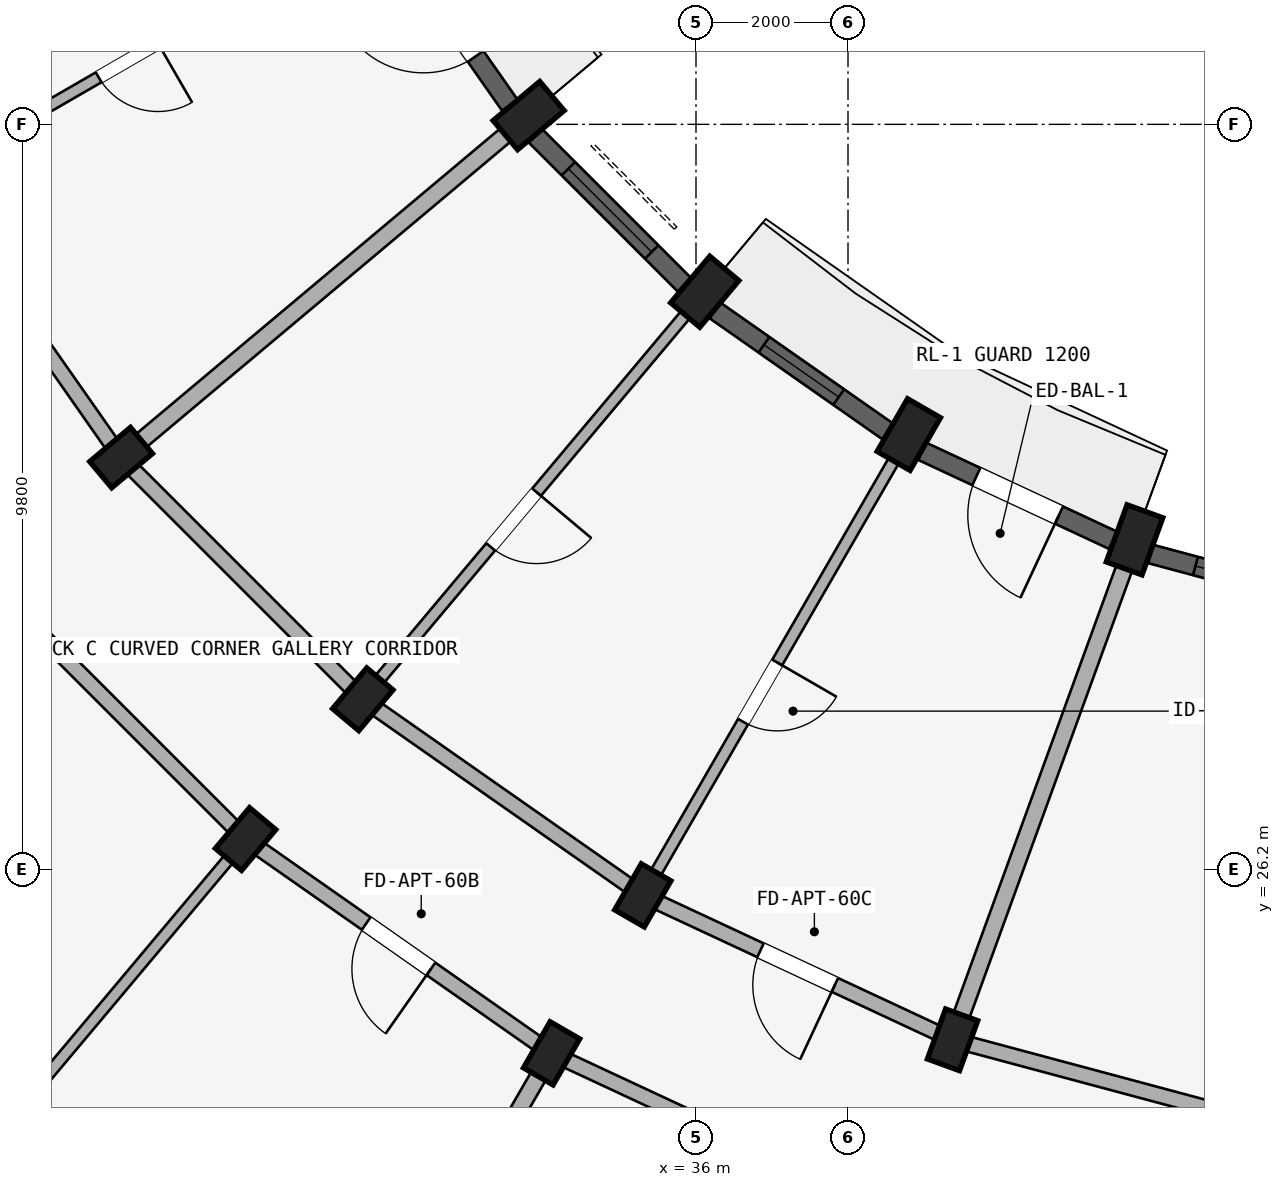
"""IFC4 building model, lengths in metres.
Left out: names, types, materials, properties, quantities, classifications, styles, units other than length and angle.
Written with IfcOpenShell. Run it as: python <this file> out.ifc"""

import sys

from ifc_helpers import new_model, si_unit, direction, frame, frame_2d, origin, origin_2d, place, context, subcontext, project, spatial, rectangle, extrude, element, fill, save


model = new_model("IFC4")
c1 = context("Model", 3, precision=1e-05, world=origin(), true_north=direction((0.0, 1.0)))
c2 = subcontext(c1, "Body", "Model", "MODEL_VIEW")
j1 = project(units=[si_unit("LENGTHUNIT", "METRE"), si_unit("PLANEANGLEUNIT", "RADIAN")], contexts=[c1])
p1 = place(None, origin())
s1 = spatial("IfcSite", under=j1, at=p1, CompositionType="ELEMENT")
p2 = place(p1, origin())
s2 = spatial("IfcBuilding", under=s1, at=p2, CompositionType="ELEMENT")
p3 = place(p2, frame((0.0, 0.0, 18.15)))
s3 = spatial("IfcBuildingStorey", under=s2, at=p3, CompositionType="ELEMENT", Elevation=18.15)
p4 = place(p3, frame((41.77, 30.534, 0.0), z_axis=(0.0, 0.0, 1.0), x_axis=(-0.939692620786, 0.342020143326, 0.0)))
e1 = element("IfcColumn", 1, at=p4, inside=s3, PredefinedType="COLUMN", context=c2, shape_type="SweptSolid", body=[
    extrude(rectangle(XDim=0.5, YDim=0.8, at=origin_2d()), origin(), (0.0, 0.0, 1.0), 2.93),
])
p5 = place(p3, frame((39.376, 23.956, 0.0), z_axis=(0.0, 0.0, 1.0), x_axis=(-0.939692620786, 0.342020143326, 0.0)))
e2 = element("IfcColumn", 2, at=p5, inside=s3, PredefinedType="COLUMN", context=c2, shape_type="SweptSolid", body=[
    extrude(rectangle(XDim=0.45, YDim=0.7, at=origin_2d()), origin(), (0.0, 0.0, 1.0), 2.93),
])
p6 = place(p3, frame((38.8, 31.919, 0.0), z_axis=(0.0, 0.0, 1.0), x_axis=(-0.866025403784, 0.5, 0.0)))
e3 = element("IfcColumn", 3, at=p6, inside=s3, PredefinedType="COLUMN", context=c2, shape_type="SweptSolid", body=[
    extrude(rectangle(XDim=0.5, YDim=0.8, at=origin_2d()), origin(), (0.0, 0.0, 1.0), 2.93),
])
for number, where, z_axis, x_axis in (
    (4, (35.3, 25.856, 0.0), (0.0, 0.0, 1.0), (-0.866, 0.5, 0.0)),
    (5, (34.1, 23.778, 0.0), (0.0, 0.0, 1.0), (-0.866, 0.5, 0.0)),
):
    element("IfcColumn", number, at=place(p3, frame(where, z_axis=z_axis, x_axis=x_axis)), inside=s3, PredefinedType="COLUMN", context=c2, shape_type="SweptSolid", body=[
        extrude(rectangle(XDim=0.45, YDim=0.7, at=origin_2d()), origin(), (0.0, 0.0, 1.0), 2.93),
    ])
p7 = place(p3, frame((36.115, 33.798, 0.0), z_axis=(0.0, 0.0, 1.0), x_axis=(-0.766044443119, 0.642787609687, 0.0)))
e6 = element("IfcColumn", 6, at=p7, inside=s3, PredefinedType="COLUMN", context=c2, shape_type="SweptSolid", body=[
    extrude(rectangle(XDim=0.5, YDim=0.8, at=origin_2d()), origin(), (0.0, 0.0, 1.0), 2.93),
])
for number, where, z_axis, x_axis in (
    (7, (31.616, 28.436, 0.0), (0.0, 0.0, 1.0), (-0.766, 0.643, 0.0)),
    (8, (30.073, 26.598, 0.0), (0.0, 0.0, 1.0), (-0.766, 0.643, 0.0)),
):
    element("IfcColumn", number, at=place(p3, frame(where, z_axis=z_axis, x_axis=x_axis)), inside=s3, PredefinedType="COLUMN", context=c2, shape_type="SweptSolid", body=[
        extrude(rectangle(XDim=0.45, YDim=0.7, at=origin_2d()), origin(), (0.0, 0.0, 1.0), 2.93),
    ])
p8 = place(p3, frame((33.798, 36.115, 0.0), z_axis=(0.0, 0.0, 1.0), x_axis=(-0.642787609687, 0.766044443119, 0.0)))
e9 = element("IfcColumn", 9, at=p8, inside=s3, PredefinedType="COLUMN", context=c2, shape_type="SweptSolid", body=[
    extrude(rectangle(XDim=0.5, YDim=0.8, at=origin_2d()), origin(), (0.0, 0.0, 1.0), 2.93),
])
p9 = place(p3, frame((28.436, 31.616, 0.0), z_axis=(0.0, 0.0, 1.0), x_axis=(-0.642787609687, 0.766044443119, 0.0)))
e10 = element("IfcColumn", 10, at=p9, inside=s3, PredefinedType="COLUMN", context=c2, shape_type="SweptSolid", body=[
    extrude(rectangle(XDim=0.45, YDim=0.7, at=origin_2d()), origin(), (0.0, 0.0, 1.0), 2.93),
])
p10 = place(p3, frame((43.72, 22.792, 0.0), z_axis=(0.0, 0.0, 1.0), x_axis=(-0.965934240054, 0.258787642463, 0.0)))
e11 = element("IfcWall", 11, at=p10, inside=s3, PredefinedType="STANDARD", context=c2, shape_type="SweptSolid", body=[
    extrude(rectangle(XDim=4.497, YDim=0.2, at=frame_2d((2.249, 0.0))), origin(), (0.0, 0.0, 1.0), 2.372),
])
p11 = place(p3, frame((39.376, 23.956, 0.0), z_axis=(0.0, 0.0, 1.0), x_axis=(-0.906307919131, 0.422617978463, 0.0)))
e12 = element("IfcWall", 12, at=p11, inside=s3, PredefinedType="STANDARD", context=c2, shape_type="SweptSolid", body=[
    extrude(rectangle(XDim=4.497, YDim=0.2, at=frame_2d((2.249, 0.0))), origin(), (0.0, 0.0, 1.0), 2.372),
])
p12 = place(p11, frame((1.709, 0.0, 0.0)))
e13 = element("IfcOpeningElement", 13, at=p12, cuts=e12, PredefinedType="OPENING", context=c2, shape_type="SweptSolid", body=[
    extrude(rectangle(XDim=1.08, YDim=2.15, at=frame_2d((0.54, 1.075))), frame((0.0, 0.11, 0.0), z_axis=(0.0, -1.0, 0.0), x_axis=(1.0, 0.0, 0.0)), (0.0, 0.0, 1.0), 0.22),
])
p13 = place(p3, frame((38.555, 21.701, 0.0), z_axis=(0.0, 0.0, 1.0), x_axis=(-0.906302381024, 0.422629854778, 0.0)))
e14 = element("IfcWall", 14, at=p13, inside=s3, PredefinedType="STANDARD", context=c2, shape_type="SweptSolid", body=[
    extrude(rectangle(XDim=4.915, YDim=0.2, at=frame_2d((2.458, 0.0))), origin(), (0.0, 0.0, 1.0), 2.372),
])
p14 = place(p3, frame((35.3, 25.856, 0.0), z_axis=(0.0, 0.0, 1.0), x_axis=(-0.819155404658, 0.573571637217, 0.0)))
e15 = element("IfcWall", 15, at=p14, inside=s3, PredefinedType="STANDARD", context=c2, shape_type="SweptSolid", body=[
    extrude(rectangle(XDim=4.497, YDim=0.2, at=frame_2d((2.249, 0.0))), origin(), (0.0, 0.0, 1.0), 2.372),
])
p15 = place(p3, frame((34.1, 23.778, 0.0), z_axis=(0.0, 0.0, 1.0), x_axis=(-0.819140911474, 0.573592335331, 0.0)))
e16 = element("IfcWall", 16, at=p15, inside=s3, PredefinedType="STANDARD", context=c2, shape_type="SweptSolid", body=[
    extrude(rectangle(XDim=4.916, YDim=0.2, at=frame_2d((2.458, 0.0))), origin(), (0.0, 0.0, 1.0), 2.372),
])
p16 = place(p15, frame((1.938, 0.0, 0.0)))
e17 = element("IfcOpeningElement", 17, at=p16, cuts=e16, PredefinedType="OPENING", context=c2, shape_type="SweptSolid", body=[
    extrude(rectangle(XDim=1.04, YDim=2.15, at=frame_2d((0.52, 1.075))), frame((0.0, 0.11, 0.0), z_axis=(0.0, -1.0, 0.0), x_axis=(1.0, 0.0, 0.0)), (0.0, 0.0, 1.0), 0.22),
])
p17 = place(p3, frame((31.616, 28.436, 0.0), z_axis=(0.0, 0.0, 1.0), x_axis=(-0.707106781187, 0.707106781187, 0.0)))
e18 = element("IfcWall", 18, at=p17, inside=s3, PredefinedType="STANDARD", context=c2, shape_type="SweptSolid", body=[
    extrude(rectangle(XDim=4.497, YDim=0.2, at=frame_2d((2.249, 0.0))), origin(), (0.0, 0.0, 1.0), 2.372),
])
p18 = place(p3, frame((30.073, 26.598, 0.0), z_axis=(0.0, 0.0, 1.0), x_axis=(-0.707106781187, 0.707106781187, 0.0)))
e19 = element("IfcWall", 19, at=p18, inside=s3, PredefinedType="STANDARD", context=c2, shape_type="SweptSolid", body=[
    extrude(rectangle(XDim=4.916, YDim=0.2, at=frame_2d((2.458, 0.0))), origin(), (0.0, 0.0, 1.0), 2.372),
])
p19 = place(p3, frame((28.436, 31.616, 0.0), z_axis=(0.0, 0.0, 1.0), x_axis=(-0.573571637217, 0.819155404658, 0.0)))
e20 = element("IfcWall", 20, at=p19, inside=s3, PredefinedType="STANDARD", context=c2, shape_type="SweptSolid", body=[
    extrude(rectangle(XDim=4.497, YDim=0.2, at=frame_2d((2.249, 0.0))), origin(), (0.0, 0.0, 1.0), 2.372),
])
p20 = place(p19, frame((1.749, 0.0, 0.0)))
e21 = element("IfcOpeningElement", 21, at=p20, cuts=e20, PredefinedType="OPENING", context=c2, shape_type="SweptSolid", body=[
    extrude(rectangle(XDim=1.0, YDim=2.15, at=frame_2d((0.5, 1.075))), frame((0.0, 0.11, 0.0), z_axis=(0.0, -1.0, 0.0), x_axis=(1.0, 0.0, 0.0)), (0.0, 0.0, 1.0), 0.22),
])
p21 = place(p3, frame((41.702, 30.346, 0.0), z_axis=(0.0, 0.0, 1.0), x_axis=(-0.342010221662, -0.939696231917, 0.0)))
e22 = element("IfcWall", 22, at=p21, inside=s3, PredefinedType="STANDARD", context=c2, shape_type="SweptSolid", body=[
    extrude(rectangle(XDim=6.75, YDim=0.22, at=frame_2d((3.375, 0.0))), origin(), (0.0, 0.0, 1.0), 2.372),
])
p22 = place(p3, frame((38.7, 31.746, 0.0), z_axis=(0.0, 0.0, 1.0), x_axis=(-0.499997969693, -0.866026575979, 0.0)))
e23 = element("IfcWall", 23, at=p22, inside=s3, PredefinedType="PARTITIONING", context=c2, shape_type="SweptSolid", body=[
    extrude(rectangle(XDim=6.75, YDim=0.15, at=frame_2d((3.375, 0.0))), origin(), (0.0, 0.0, 1.0), 2.372),
])
p23 = place(p22, frame((3.262, 0.0, 0.0)))
e24 = element("IfcOpeningElement", 24, at=p23, cuts=e23, PredefinedType="OPENING", context=c2, shape_type="SweptSolid", body=[
    extrude(rectangle(XDim=0.9, YDim=2.1, at=frame_2d((0.45, 1.05))), frame((0.0, 0.085, 0.0), z_axis=(0.0, -1.0, 0.0), x_axis=(1.0, 0.0, 0.0)), (0.0, 0.0, 1.0), 0.17),
])
p24 = place(p3, frame((34.05, 23.691, 0.0), z_axis=(0.0, 0.0, 1.0), x_axis=(-0.499997843263, -0.866026648973, 0.0)))
e25 = element("IfcWall", 25, at=p24, inside=s3, PredefinedType="STANDARD", context=c2, shape_type="SweptSolid", body=[
    extrude(rectangle(XDim=17.42, YDim=0.22, at=frame_2d((8.71, 0.0))), origin(), (0.0, 0.0, 1.0), 2.372),
])
p25 = place(p3, frame((35.987, 33.645, 0.0), z_axis=(0.0, 0.0, 1.0), x_axis=(-0.642784846501, -0.766046761698, 0.0)))
e26 = element("IfcWall", 26, at=p25, inside=s3, PredefinedType="PARTITIONING", context=c2, shape_type="SweptSolid", body=[
    extrude(rectangle(XDim=6.75, YDim=0.15, at=frame_2d((3.375, 0.0))), origin(), (0.0, 0.0, 1.0), 2.372),
])
p26 = place(p25, frame((3.242, 0.0, 0.0)))
e27 = element("IfcOpeningElement", 27, at=p26, cuts=e26, PredefinedType="OPENING", context=c2, shape_type="SweptSolid", body=[
    extrude(rectangle(XDim=0.94, YDim=2.1, at=frame_2d((0.47, 1.05))), frame((0.0, 0.085, 0.0), z_axis=(0.0, -1.0, 0.0), x_axis=(1.0, 0.0, 0.0)), (0.0, 0.0, 1.0), 0.17),
])
p27 = place(p3, frame((30.009, 26.521, 0.0), z_axis=(0.0, 0.0, 1.0), x_axis=(-0.642784757967, -0.766046835987, 0.0)))
e28 = element("IfcWall", 28, at=p27, inside=s3, PredefinedType="PARTITIONING", context=c2, shape_type="SweptSolid", body=[
    extrude(rectangle(XDim=17.42, YDim=0.15, at=frame_2d((8.71, 0.0))), origin(), (0.0, 0.0, 1.0), 2.372),
])
p28 = place(p27, frame((4.45, 0.0, 0.0)))
e29 = element("IfcOpeningElement", 29, at=p28, cuts=e28, PredefinedType="OPENING", context=c2, shape_type="SweptSolid", body=[
    extrude(rectangle(XDim=0.8, YDim=2.1, at=frame_2d((0.4, 1.05))), frame((0.0, 0.085, 0.0), z_axis=(0.0, -1.0, 0.0), x_axis=(1.0, 0.0, 0.0)), (0.0, 0.0, 1.0), 0.17),
])
p29 = place(p3, frame((33.645, 35.987, 0.0), z_axis=(0.0, 0.0, 1.0), x_axis=(-0.766046761698, -0.642784846501, 0.0)))
e30 = element("IfcWall", 30, at=p29, inside=s3, PredefinedType="STANDARD", context=c2, shape_type="SweptSolid", body=[
    extrude(rectangle(XDim=6.75, YDim=0.22, at=frame_2d((3.375, 0.0))), origin(), (0.0, 0.0, 1.0), 2.372),
])
p30 = place(p3, frame((31.746, 38.7, 0.0), z_axis=(0.0, 0.0, 1.0), x_axis=(-0.866026575979, -0.499997969693, 0.0)))
e31 = element("IfcWall", 31, at=p30, inside=s3, PredefinedType="PARTITIONING", context=c2, shape_type="SweptSolid", body=[
    extrude(rectangle(XDim=6.75, YDim=0.15, at=frame_2d((3.375, 0.0))), origin(), (0.0, 0.0, 1.0), 2.372),
])
p31 = place(p30, frame((3.262, 0.0, 0.0)))
e32 = element("IfcOpeningElement", 32, at=p31, cuts=e31, PredefinedType="OPENING", context=c2, shape_type="SweptSolid", body=[
    extrude(rectangle(XDim=0.9, YDim=2.1, at=frame_2d((0.45, 1.05))), frame((0.0, 0.085, 0.0), z_axis=(0.0, -1.0, 0.0), x_axis=(1.0, 0.0, 0.0)), (0.0, 0.0, 1.0), 0.17),
])
p32 = place(p3, frame((44.658, 29.631, 0.0), z_axis=(0.0, 0.0, 1.0), x_axis=(-0.965935855992, 0.25878161084, 0.0)))
e33 = element("IfcWall", 33, at=p32, inside=s3, PredefinedType="STANDARD", context=c2, shape_type="SweptSolid", body=[
    extrude(rectangle(XDim=2.77, YDim=0.25, at=frame_2d((1.385, 0.0))), origin(), (0.0, 0.0, 1.0), 2.422),
])
p33 = place(p32, frame((0.61, 0.0, 0.622)))
e34 = element("IfcOpeningElement", 34, at=p33, cuts=e33, PredefinedType="OPENING", context=c2, shape_type="SweptSolid", body=[
    extrude(rectangle(XDim=1.55, YDim=1.6, at=frame_2d((0.775, 0.8))), frame((0.0, 0.135, 0.0), z_axis=(0.0, -1.0, 0.0), x_axis=(1.0, 0.0, 0.0)), (0.0, 0.0, 1.0), 0.27),
])
p34 = place(p3, frame((41.487, 30.528, 0.0), z_axis=(0.0, 0.0, 1.0), x_axis=(-0.906293449611, 0.422649007088, 0.0)))
e35 = element("IfcWall", 35, at=p34, inside=s3, PredefinedType="STANDARD", context=c2, shape_type="SweptSolid", body=[
    extrude(rectangle(XDim=2.77, YDim=0.25, at=frame_2d((1.385, 0.0))), origin(), (0.0, 0.0, 1.0), 2.422),
])
p35 = place(p34, frame((0.785, 0.0, 0.0)))
e36 = element("IfcOpeningElement", 36, at=p35, cuts=e35, PredefinedType="OPENING", context=c2, shape_type="SweptSolid", body=[
    extrude(rectangle(XDim=1.2, YDim=2.15, at=frame_2d((0.6, 1.075))), frame((0.0, 0.135, 0.0), z_axis=(0.0, -1.0, 0.0), x_axis=(1.0, 0.0, 0.0)), (0.0, 0.0, 1.0), 0.27),
])
p36 = place(p3, frame((38.521, 31.962, 0.0), z_axis=(0.0, 0.0, 1.0), x_axis=(-0.819111815273, 0.573633885053, 0.0)))
e37 = element("IfcWall", 37, at=p36, inside=s3, PredefinedType="STANDARD", context=c2, shape_type="SweptSolid", body=[
    extrude(rectangle(XDim=2.77, YDim=0.25, at=frame_2d((1.385, 0.0))), origin(), (0.0, 0.0, 1.0), 2.422),
])
p37 = place(p36, frame((0.785, 0.0, 0.722)))
e38 = element("IfcOpeningElement", 38, at=p37, cuts=e37, PredefinedType="OPENING", context=c2, shape_type="SweptSolid", body=[
    extrude(rectangle(XDim=1.2, YDim=1.5, at=frame_2d((0.6, 0.75))), frame((0.0, 0.135, 0.0), z_axis=(0.0, -1.0, 0.0), x_axis=(1.0, 0.0, 0.0)), (0.0, 0.0, 1.0), 0.27),
])
p38 = place(p3, frame((35.848, 33.889, 0.0), z_axis=(0.0, 0.0, 1.0), x_axis=(-0.707106781187, 0.707106781187, 0.0)))
e39 = element("IfcWall", 39, at=p38, inside=s3, PredefinedType="STANDARD", context=c2, shape_type="SweptSolid", body=[
    extrude(rectangle(XDim=2.77, YDim=0.25, at=frame_2d((1.385, 0.0))), origin(), (0.0, 0.0, 1.0), 2.422),
])
p39 = place(p38, frame((0.61, 0.0, 0.622)))
e40 = element("IfcOpeningElement", 40, at=p39, cuts=e39, PredefinedType="OPENING", context=c2, shape_type="SweptSolid", body=[
    extrude(rectangle(XDim=1.55, YDim=1.6, at=frame_2d((0.775, 0.8))), frame((0.0, 0.135, 0.0), z_axis=(0.0, -1.0, 0.0), x_axis=(1.0, 0.0, 0.0)), (0.0, 0.0, 1.0), 0.27),
])
p40 = place(p3, frame((33.551, 36.252, 0.0), z_axis=(0.0, 0.0, 1.0), x_axis=(-0.573633885053, 0.819111815273, 0.0)))
e41 = element("IfcWall", 41, at=p40, inside=s3, PredefinedType="STANDARD", context=c2, shape_type="SweptSolid", body=[
    extrude(rectangle(XDim=2.77, YDim=0.25, at=frame_2d((1.385, 0.0))), origin(), (0.0, 0.0, 1.0), 2.422),
])
p41 = place(p40, frame((0.785, 0.0, 0.0)))
e42 = element("IfcOpeningElement", 42, at=p41, cuts=e41, PredefinedType="OPENING", context=c2, shape_type="SweptSolid", body=[
    extrude(rectangle(XDim=1.2, YDim=2.15, at=frame_2d((0.6, 1.075))), frame((0.0, 0.135, 0.0), z_axis=(0.0, -1.0, 0.0), x_axis=(1.0, 0.0, 0.0)), (0.0, 0.0, 1.0), 0.27),
])
p42 = place(p33, origin())
e43 = element("IfcWindow", 43, at=p42, inside=s3, PartitioningType="DOUBLE_PANEL_VERTICAL", PredefinedType="WINDOW", context=c2, shape_type="SweptSolid", body=[
    extrude(rectangle(XDim=1.55, YDim=1.6, at=frame_2d((0.775, 0.8))), frame((0.0, 0.03, 0.0), z_axis=(0.0, -1.0, 0.0), x_axis=(1.0, 0.0, 0.0)), (0.0, 0.0, 1.0), 0.06),
])
fill(e34, e43)
p43 = place(p37, origin())
e44 = element("IfcWindow", 44, at=p43, inside=s3, PartitioningType="SINGLE_PANEL", PredefinedType="WINDOW", context=c2, shape_type="SweptSolid", body=[
    extrude(rectangle(XDim=1.2, YDim=1.5, at=frame_2d((0.6, 0.75))), frame((0.0, 0.03, 0.0), z_axis=(0.0, -1.0, 0.0), x_axis=(1.0, 0.0, 0.0)), (0.0, 0.0, 1.0), 0.06),
])
fill(e38, e44)
p44 = place(p39, origin())
e45 = element("IfcWindow", 45, at=p44, inside=s3, PartitioningType="DOUBLE_PANEL_VERTICAL", PredefinedType="WINDOW", context=c2, shape_type="SweptSolid", body=[
    extrude(rectangle(XDim=1.55, YDim=1.6, at=frame_2d((0.775, 0.8))), frame((0.0, 0.03, 0.0), z_axis=(0.0, -1.0, 0.0), x_axis=(1.0, 0.0, 0.0)), (0.0, 0.0, 1.0), 0.06),
])
fill(e40, e45)
p45 = place(p23, frame((0.9, 0.0, 0.0), z_axis=(0.0, 0.0, 1.0), x_axis=(-1.0, 0.0, 0.0)))
e46 = element("IfcDoor", 46, at=p45, inside=s3, OperationType="SINGLE_SWING_RIGHT", PredefinedType="DOOR", context=c2, shape_type="SweptSolid", body=[
    extrude(rectangle(XDim=0.9, YDim=2.1, at=frame_2d((0.45, 1.05))), frame((0.0, 0.025, 0.0), z_axis=(0.0, -1.0, 0.0), x_axis=(1.0, 0.0, 0.0)), (0.0, 0.0, 1.0), 0.05),
])
fill(e24, e46)
p46 = place(p26, origin())
e47 = element("IfcDoor", 47, at=p46, inside=s3, OperationType="SINGLE_SWING_LEFT", PredefinedType="DOOR", context=c2, shape_type="SweptSolid", body=[
    extrude(rectangle(XDim=0.94, YDim=2.1, at=frame_2d((0.47, 1.05))), frame((0.0, 0.025, 0.0), z_axis=(0.0, -1.0, 0.0), x_axis=(1.0, 0.0, 0.0)), (0.0, 0.0, 1.0), 0.05),
])
fill(e27, e47)
p47 = place(p31, origin())
e48 = element("IfcDoor", 48, at=p47, inside=s3, OperationType="SINGLE_SWING_LEFT", PredefinedType="DOOR", context=c2, shape_type="SweptSolid", body=[
    extrude(rectangle(XDim=0.9, YDim=2.1, at=frame_2d((0.45, 1.05))), frame((0.0, 0.025, 0.0), z_axis=(0.0, -1.0, 0.0), x_axis=(1.0, 0.0, 0.0)), (0.0, 0.0, 1.0), 0.05),
])
fill(e32, e48)
p48 = place(p16, origin())
e49 = element("IfcDoor", 49, at=p48, inside=s3, OperationType="SINGLE_SWING_LEFT", PredefinedType="DOOR", context=c2, shape_type="SweptSolid", body=[
    extrude(rectangle(XDim=1.04, YDim=2.15, at=frame_2d((0.52, 1.075))), frame((0.0, 0.025, 0.0), z_axis=(0.0, -1.0, 0.0), x_axis=(1.0, 0.0, 0.0)), (0.0, 0.0, 1.0), 0.05),
])
fill(e17, e49)
p49 = place(p12, origin())
e50 = element("IfcDoor", 50, at=p49, inside=s3, OperationType="SINGLE_SWING_LEFT", PredefinedType="DOOR", context=c2, shape_type="SweptSolid", body=[
    extrude(rectangle(XDim=1.08, YDim=2.15, at=frame_2d((0.54, 1.075))), frame((0.0, 0.025, 0.0), z_axis=(0.0, -1.0, 0.0), x_axis=(1.0, 0.0, 0.0)), (0.0, 0.0, 1.0), 0.05),
])
fill(e13, e50)
p50 = place(p35, frame((1.2, 0.0, 0.0), z_axis=(0.0, 0.0, 1.0), x_axis=(-1.0, 0.0, 0.0)))
e51 = element("IfcDoor", 51, at=p50, inside=s3, OperationType="SINGLE_SWING_RIGHT", PredefinedType="DOOR", context=c2, shape_type="SweptSolid", body=[
    extrude(rectangle(XDim=1.2, YDim=2.15, at=frame_2d((0.6, 1.075))), frame((0.0, 0.025, 0.0), z_axis=(0.0, -1.0, 0.0), x_axis=(1.0, 0.0, 0.0)), (0.0, 0.0, 1.0), 0.05),
])
fill(e36, e51)
p51 = place(p41, frame((1.2, 0.0, 0.0), z_axis=(0.0, 0.0, 1.0), x_axis=(-1.0, 0.0, 0.0)))
e52 = element("IfcDoor", 52, at=p51, inside=s3, OperationType="SINGLE_SWING_LEFT", PredefinedType="DOOR", context=c2, shape_type="SweptSolid", body=[
    extrude(rectangle(XDim=1.2, YDim=2.15, at=frame_2d((0.6, 1.075))), frame((0.0, 0.025, 0.0), z_axis=(0.0, -1.0, 0.0), x_axis=(1.0, 0.0, 0.0)), (0.0, 0.0, 1.0), 0.05),
])
fill(e42, e52)
save(model, sys.argv[1])
